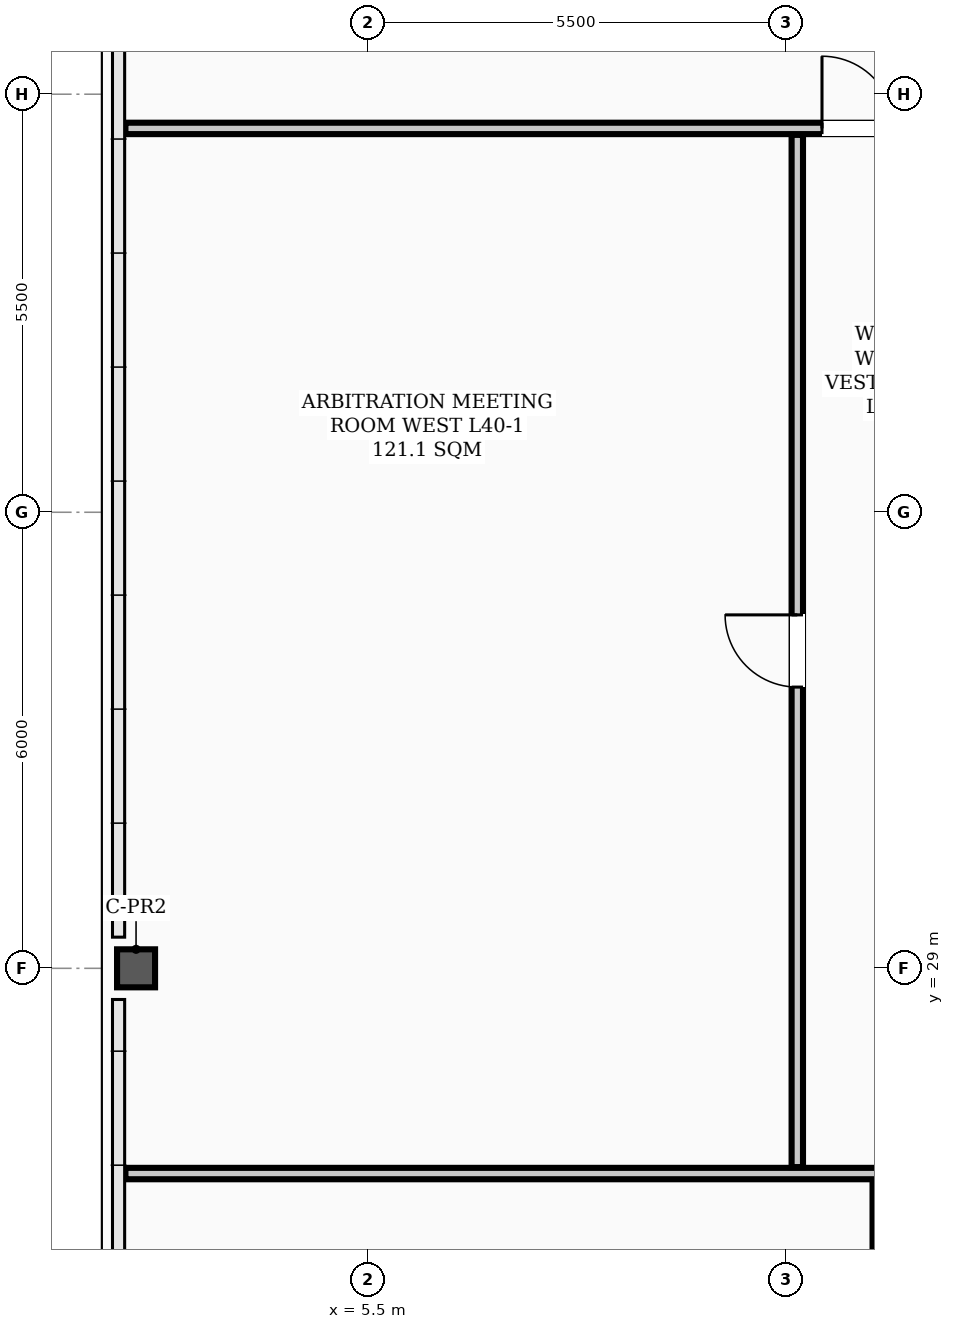
"""IFC4 building model, lengths in metres.
Left out: names, types, materials, properties, quantities, classifications, styles, units other than length and angle.
Written with IfcOpenShell. Run it as: python <this file> out.ifc"""

import sys

from ifc_helpers import new_model, si_unit, direction, frame, frame_2d, origin, origin_2d, place, context, subcontext, project, spatial, rectangle, hollow_rectangle, extrude, element, fill, save


model = new_model("IFC4")
c1 = context("Model", 3, precision=1e-05, world=origin(), true_north=direction((0.0, 1.0)))
c2 = subcontext(c1, "Body", "Model", "MODEL_VIEW")
j1 = project(units=[si_unit("LENGTHUNIT", "METRE"), si_unit("PLANEANGLEUNIT", "RADIAN")], contexts=[c1])
p1 = place(None, origin())
s1 = spatial("IfcSite", under=j1, at=p1, CompositionType="ELEMENT")
p2 = place(p1, origin())
s2 = spatial("IfcBuilding", under=s1, at=p2, CompositionType="ELEMENT")
p3 = place(p2, frame((0.0, 0.0, 161.7)))
s3 = spatial("IfcBuildingStorey", under=s2, at=p3, CompositionType="ELEMENT", Elevation=161.7)
p4 = place(p3, frame((2.45, 29.0, 0.0), z_axis=(0.0, 0.0, 1.0), x_axis=(1.0, 0.0, 0.0)))
e1 = element("IfcColumn", 1, at=p4, inside=s3, PredefinedType="COLUMN", context=c2, shape_type="SweptSolid", body=[
    extrude(hollow_rectangle(XDim=0.5, YDim=0.5, WallThickness=0.024, InnerFilletRadius=0.012, OuterFilletRadius=0.036, at=origin_2d()), origin(), (0.0, 0.0, 1.0), 3.9),
])
p5 = place(p3, frame((2.31, 26.3, 0.0), z_axis=(0.0, 0.0, 1.0), x_axis=(1.0, 0.0, 0.0)))
e2 = element("IfcWall", 2, at=p5, inside=s3, PredefinedType="PARTITIONING", context=c2, shape_type="SweptSolid", body=[
    extrude(rectangle(XDim=46.38, YDim=0.15, at=frame_2d((23.19, 0.0))), origin(), (0.0, 0.0, 1.0), 3.2),
])
p6 = place(p5, frame((12.915, 0.0, 0.0)))
e3 = element("IfcOpeningElement", 3, at=p6, cuts=e2, PredefinedType="OPENING", context=c2, shape_type="SweptSolid", body=[
    extrude(rectangle(XDim=0.95, YDim=2.08, at=frame_2d((0.475, 1.04))), frame((0.0, 0.085, 0.0), z_axis=(0.0, -1.0, 0.0), x_axis=(1.0, 0.0, 0.0)), (0.0, 0.0, 1.0), 0.17),
])
p7 = place(p5, frame((19.115, 0.0, 0.0)))
e4 = element("IfcOpeningElement", 4, at=p7, cuts=e2, PredefinedType="OPENING", context=c2, shape_type="SweptSolid", body=[
    extrude(rectangle(XDim=0.95, YDim=2.08, at=frame_2d((0.475, 1.04))), frame((0.0, 0.085, 0.0), z_axis=(0.0, -1.0, 0.0), x_axis=(1.0, 0.0, 0.0)), (0.0, 0.0, 1.0), 0.17),
])
p8 = place(p5, frame((25.915, 0.0, 0.0)))
e5 = element("IfcOpeningElement", 5, at=p8, cuts=e2, PredefinedType="OPENING", context=c2, shape_type="SweptSolid", body=[
    extrude(rectangle(XDim=0.95, YDim=2.08, at=frame_2d((0.475, 1.04))), frame((0.0, 0.085, 0.0), z_axis=(0.0, -1.0, 0.0), x_axis=(1.0, 0.0, 0.0)), (0.0, 0.0, 1.0), 0.17),
])
p9 = place(p5, frame((36.515, 0.0, 0.0)))
e6 = element("IfcOpeningElement", 6, at=p9, cuts=e2, PredefinedType="OPENING", context=c2, shape_type="SweptSolid", body=[
    extrude(rectangle(XDim=0.95, YDim=2.08, at=frame_2d((0.475, 1.04))), frame((0.0, 0.085, 0.0), z_axis=(0.0, -1.0, 0.0), x_axis=(1.0, 0.0, 0.0)), (0.0, 0.0, 1.0), 0.17),
])
p10 = place(p5, frame((43.56, 0.0, 0.0)))
e7 = element("IfcOpeningElement", 7, at=p10, cuts=e2, PredefinedType="OPENING", context=c2, shape_type="SweptSolid", body=[
    extrude(rectangle(XDim=0.95, YDim=2.08, at=frame_2d((0.475, 1.04))), frame((0.0, 0.085, 0.0), z_axis=(0.0, -1.0, 0.0), x_axis=(1.0, 0.0, 0.0)), (0.0, 0.0, 1.0), 0.17),
])
p11 = place(p3, frame((2.31, 40.05, 0.0), z_axis=(0.0, 0.0, 1.0), x_axis=(1.0, 0.0, 0.0)))
e8 = element("IfcWall", 8, at=p11, inside=s3, PredefinedType="PARTITIONING", context=c2, shape_type="SweptSolid", body=[
    extrude(rectangle(XDim=11.19, YDim=0.15, at=frame_2d((5.595, 0.0))), origin(), (0.0, 0.0, 1.0), 3.2),
])
p12 = place(p11, frame((9.165, 0.0, 0.0)))
e9 = element("IfcOpeningElement", 9, at=p12, cuts=e8, PredefinedType="OPENING", context=c2, shape_type="SweptSolid", body=[
    extrude(rectangle(XDim=0.95, YDim=2.08, at=frame_2d((0.475, 1.04))), frame((0.0, 0.085, 0.0), z_axis=(0.0, -1.0, 0.0), x_axis=(1.0, 0.0, 0.0)), (0.0, 0.0, 1.0), 0.17),
])
p13 = place(p3, frame((11.15, 26.385, 0.0), z_axis=(0.0, 0.0, 1.0), x_axis=(0.0, 1.0, 0.0)))
e10 = element("IfcWall", 10, at=p13, inside=s3, PredefinedType="PARTITIONING", context=c2, shape_type="SweptSolid", body=[
    extrude(rectangle(XDim=13.58, YDim=0.15, at=frame_2d((6.79, 0.0))), origin(), (0.0, 0.0, 1.0), 3.1),
])
p14 = place(p13, frame((6.315, 0.0, 0.0)))
e11 = element("IfcOpeningElement", 11, at=p14, cuts=e10, PredefinedType="OPENING", context=c2, shape_type="SweptSolid", body=[
    extrude(rectangle(XDim=0.95, YDim=2.08, at=frame_2d((0.475, 1.04))), frame((0.0, 0.085, 0.0), z_axis=(0.0, -1.0, 0.0), x_axis=(1.0, 0.0, 0.0)), (0.0, 0.0, 1.0), 0.17),
])
p15 = place(p3, frame((12.2, 16.31, 0.0), z_axis=(0.0, 0.0, 1.0), x_axis=(0.0, 1.0, 0.0)))
e12 = element("IfcWall", 12, at=p15, inside=s3, PredefinedType="PARTITIONING", context=c2, shape_type="SweptSolid", body=[
    extrude(rectangle(XDim=9.905, YDim=0.12, at=frame_2d((4.953, 0.0))), origin(), (0.0, 0.0, 1.0), 3.1),
])
p16 = place(p15, frame((7.915, 0.0, 0.0)))
e13 = element("IfcOpeningElement", 13, at=p16, cuts=e12, PredefinedType="OPENING", context=c2, shape_type="SweptSolid", body=[
    extrude(rectangle(XDim=0.95, YDim=2.08, at=frame_2d((0.475, 1.04))), frame((0.0, 0.07, 0.0), z_axis=(0.0, -1.0, 0.0), x_axis=(1.0, 0.0, 0.0)), (0.0, 0.0, 1.0), 0.14),
])
p17 = place(p14, origin())
e14 = element("IfcDoor", 14, at=p17, inside=s3, OperationType="SINGLE_SWING_RIGHT", PredefinedType="DOOR", context=c2, shape_type="SweptSolid", body=[
    extrude(rectangle(XDim=0.95, YDim=2.08, at=frame_2d((0.475, 1.04))), frame((0.0, 0.025, 0.0), z_axis=(0.0, -1.0, 0.0), x_axis=(1.0, 0.0, 0.0)), (0.0, 0.0, 1.0), 0.05),
])
fill(e11, e14)
p18 = place(p12, origin())
e15 = element("IfcDoor", 15, at=p18, inside=s3, OperationType="SINGLE_SWING_LEFT", PredefinedType="DOOR", context=c2, shape_type="SweptSolid", body=[
    extrude(rectangle(XDim=0.95, YDim=2.08, at=frame_2d((0.475, 1.04))), frame((0.0, 0.025, 0.0), z_axis=(0.0, -1.0, 0.0), x_axis=(1.0, 0.0, 0.0)), (0.0, 0.0, 1.0), 0.05),
])
fill(e9, e15)
save(model, sys.argv[1])
